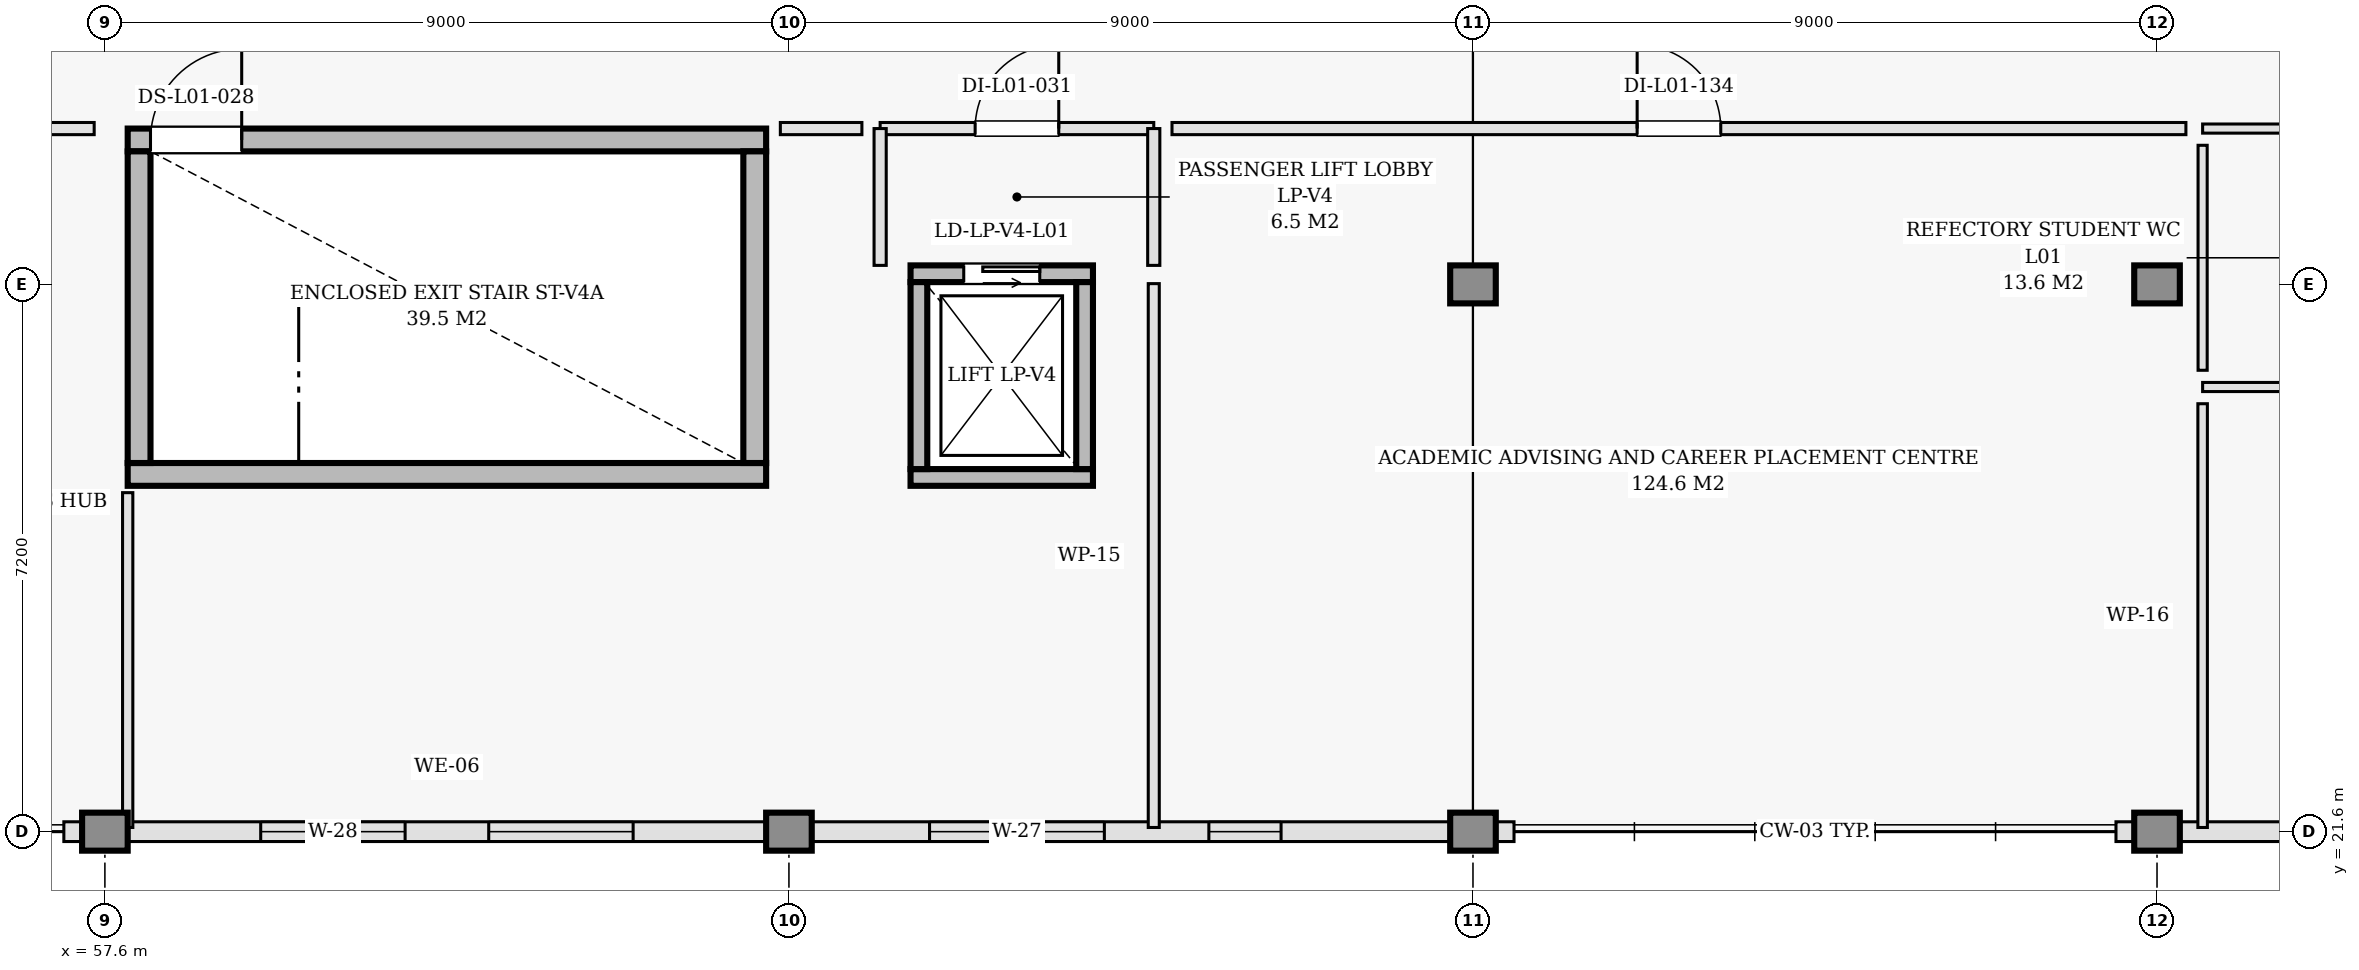
"""IFC4 building model, lengths in metres.
Left out: names, types, materials, properties, quantities, classifications, styles, units other than length and angle.
Written with IfcOpenShell. Run it as: python <this file> out.ifc"""

import sys

from ifc_helpers import new_model, si_unit, direction, frame, frame_2d, origin, origin_2d, place, context, subcontext, project, spatial, rectangle, extrude, element, fill, save


model = new_model("IFC4")
c1 = context("Model", 3, precision=1e-05, world=origin(), true_north=direction((0.0, 1.0)))
c2 = subcontext(c1, "Body", "Model", "MODEL_VIEW")
j1 = project(units=[si_unit("LENGTHUNIT", "METRE"), si_unit("PLANEANGLEUNIT", "RADIAN")], contexts=[c1])
p1 = place(None, origin())
s1 = spatial("IfcSite", under=j1, at=p1, CompositionType="ELEMENT")
p2 = place(p1, origin())
s2 = spatial("IfcBuilding", under=s1, at=p2, CompositionType="ELEMENT")
p3 = place(p2, frame((0.0, 0.0, 4.8)))
s3 = spatial("IfcBuildingStorey", under=s2, at=p3, CompositionType="ELEMENT", Elevation=4.8)
for number, where, z_axis, x_axis in (
    (1, (57.6, 21.6, 0.0), (0.0, 0.0, 1.0), (1.0, 0.0, 0.0)),
    (2, (66.6, 21.6, 0.0), (0.0, 0.0, 1.0), (1.0, 0.0, 0.0)),
    (3, (75.6, 21.6, 0.0), (0.0, 0.0, 1.0), (1.0, 0.0, 0.0)),
    (4, (75.6, 28.8, 0.0), (0.0, 0.0, 1.0), (1.0, 0.0, 0.0)),
    (5, (84.6, 21.6, 0.0), (0.0, 0.0, 1.0), (1.0, 0.0, 0.0)),
    (6, (84.6, 28.8, 0.0), (0.0, 0.0, 1.0), (1.0, 0.0, 0.0)),
):
    element("IfcColumn", number, at=place(p3, frame(where, z_axis=z_axis, x_axis=x_axis)), inside=s3, PredefinedType="COLUMN", context=c2, shape_type="SweptSolid", body=[
        extrude(rectangle(XDim=0.5, YDim=0.5, at=origin_2d()), origin(), (0.0, 0.0, 1.0), 4.8),
    ])
p4 = place(p3, frame((57.06, 21.6, 0.0), z_axis=(0.0, 0.0, 1.0), x_axis=(1.0, 0.0, 0.0)))
e7 = element("IfcWall", 7, at=p4, inside=s3, PredefinedType="SOLIDWALL", context=c2, shape_type="SweptSolid", body=[
    extrude(rectangle(XDim=0.54, YDim=0.26, at=frame_2d((0.27, 0.0))), origin(), (0.0, 0.0, 1.0), 4.8),
])
p5 = place(p3, frame((57.6, 21.6, 0.0), z_axis=(0.0, 0.0, 1.0), x_axis=(1.0, 0.0, 0.0)))
e8 = element("IfcWall", 8, at=p5, inside=s3, PredefinedType="SOLIDWALL", context=c2, shape_type="SweptSolid", body=[
    extrude(rectangle(XDim=9.0, YDim=0.26, at=frame_2d((4.5, 0.0))), origin(), (0.0, 0.0, 1.0), 4.8),
])
p6 = place(p5, frame((2.05, 0.0, 0.9)))
e9 = element("IfcOpeningElement", 9, at=p6, cuts=e8, PredefinedType="OPENING", context=c2, shape_type="SweptSolid", body=[
    extrude(rectangle(XDim=1.9, YDim=1.85, at=frame_2d((0.95, 0.925))), frame((0.0, 0.14, 0.0), z_axis=(0.0, -1.0, 0.0), x_axis=(1.0, 0.0, 0.0)), (0.0, 0.0, 1.0), 0.28),
])
p7 = place(p5, frame((5.05, 0.0, 0.9)))
e10 = element("IfcOpeningElement", 10, at=p7, cuts=e8, PredefinedType="OPENING", context=c2, shape_type="SweptSolid", body=[
    extrude(rectangle(XDim=1.9, YDim=1.85, at=frame_2d((0.95, 0.925))), frame((0.0, 0.14, 0.0), z_axis=(0.0, -1.0, 0.0), x_axis=(1.0, 0.0, 0.0)), (0.0, 0.0, 1.0), 0.28),
])
p8 = place(p3, frame((66.6, 21.6, 0.0), z_axis=(0.0, 0.0, 1.0), x_axis=(1.0, 0.0, 0.0)))
e11 = element("IfcWall", 11, at=p8, inside=s3, PredefinedType="SOLIDWALL", context=c2, shape_type="SweptSolid", body=[
    extrude(rectangle(XDim=9.0, YDim=0.26, at=frame_2d((4.5, 0.0))), origin(), (0.0, 0.0, 1.0), 4.8),
])
p9 = place(p8, frame((1.85, 0.0, 0.9)))
e12 = element("IfcOpeningElement", 12, at=p9, cuts=e11, PredefinedType="OPENING", context=c2, shape_type="SweptSolid", body=[
    extrude(rectangle(XDim=2.3, YDim=1.9, at=frame_2d((1.15, 0.95))), frame((0.0, 0.14, 0.0), z_axis=(0.0, -1.0, 0.0), x_axis=(1.0, 0.0, 0.0)), (0.0, 0.0, 1.0), 0.28),
])
p10 = place(p8, frame((5.525, 0.0, 0.9)))
e13 = element("IfcOpeningElement", 13, at=p10, cuts=e11, PredefinedType="OPENING", context=c2, shape_type="SweptSolid", body=[
    extrude(rectangle(XDim=0.95, YDim=1.35, at=frame_2d((0.475, 0.675))), frame((0.0, 0.14, 0.0), z_axis=(0.0, -1.0, 0.0), x_axis=(1.0, 0.0, 0.0)), (0.0, 0.0, 1.0), 0.28),
])
p11 = place(p3, frame((75.6, 21.6, 0.0), z_axis=(0.0, 0.0, 1.0), x_axis=(1.0, 0.0, 0.0)))
e14 = element("IfcWall", 14, at=p11, inside=s3, PredefinedType="SOLIDWALL", context=c2, shape_type="SweptSolid", body=[
    extrude(rectangle(XDim=0.54, YDim=0.26, at=frame_2d((0.27, 0.0))), origin(), (0.0, 0.0, 1.0), 4.8),
])
p12 = place(p3, frame((84.06, 21.6, 0.0), z_axis=(0.0, 0.0, 1.0), x_axis=(1.0, 0.0, 0.0)))
e15 = element("IfcWall", 15, at=p12, inside=s3, PredefinedType="SOLIDWALL", context=c2, shape_type="SweptSolid", body=[
    extrude(rectangle(XDim=0.54, YDim=0.26, at=frame_2d((0.27, 0.0))), origin(), (0.0, 0.0, 1.0), 4.8),
])
p13 = place(p3, frame((84.6, 21.6, 0.0), z_axis=(0.0, 0.0, 1.0), x_axis=(1.0, 0.0, 0.0)))
e16 = element("IfcWall", 16, at=p13, inside=s3, PredefinedType="SOLIDWALL", context=c2, shape_type="SweptSolid", body=[
    extrude(rectangle(XDim=9.0, YDim=0.26, at=frame_2d((4.5, 0.0))), origin(), (0.0, 0.0, 1.0), 4.8),
])
p14 = place(p13, frame((1.7, 0.0, 0.9)))
e17 = element("IfcOpeningElement", 17, at=p14, cuts=e16, PredefinedType="OPENING", context=c2, shape_type="SweptSolid", body=[
    extrude(rectangle(XDim=2.6, YDim=1.95, at=frame_2d((1.3, 0.975))), frame((0.0, 0.14, 0.0), z_axis=(0.0, -1.0, 0.0), x_axis=(1.0, 0.0, 0.0)), (0.0, 0.0, 1.0), 0.28),
])
p15 = place(p13, frame((4.7, 0.0, 0.9)))
e18 = element("IfcOpeningElement", 18, at=p15, cuts=e16, PredefinedType="OPENING", context=c2, shape_type="SweptSolid", body=[
    extrude(rectangle(XDim=2.6, YDim=1.95, at=frame_2d((1.3, 0.975))), frame((0.0, 0.14, 0.0), z_axis=(0.0, -1.0, 0.0), x_axis=(1.0, 0.0, 0.0)), (0.0, 0.0, 1.0), 0.28),
])
p16 = place(p3, frame((57.9, 26.3, 0.0), z_axis=(0.0, 0.0, 1.0), x_axis=(1.0, 0.0, 0.0)))
e19 = element("IfcWall", 19, at=p16, inside=s3, PredefinedType="SHEAR", context=c2, shape_type="SweptSolid", body=[
    extrude(rectangle(XDim=8.4, YDim=0.3, at=frame_2d((4.2, 0.0))), origin(), (0.0, 0.0, 1.0), 4.6),
])
p17 = place(p3, frame((57.9, 30.7, 0.0), z_axis=(0.0, 0.0, 1.0), x_axis=(1.0, 0.0, 0.0)))
e20 = element("IfcWall", 20, at=p17, inside=s3, PredefinedType="SHEAR", context=c2, shape_type="SweptSolid", body=[
    extrude(rectangle(XDim=8.4, YDim=0.3, at=frame_2d((4.2, 0.0))), origin(), (0.0, 0.0, 1.0), 4.6),
])
p18 = place(p17, frame((0.3, 0.0, 0.0)))
e21 = element("IfcOpeningElement", 21, at=p18, cuts=e20, PredefinedType="OPENING", context=c2, shape_type="SweptSolid", body=[
    extrude(rectangle(XDim=1.2, YDim=2.15, at=frame_2d((0.6, 1.075))), frame((0.0, 0.16, 0.0), z_axis=(0.0, -1.0, 0.0), x_axis=(1.0, 0.0, 0.0)), (0.0, 0.0, 1.0), 0.32),
])
for number, where, z_axis, x_axis in (
    (22, (58.05, 26.45, 0.0), (0.0, 0.0, 1.0), (0.0, 1.0, 0.0)),
    (23, (66.15, 26.45, 0.0), (0.0, 0.0, 1.0), (0.0, 1.0, 0.0)),
):
    element("IfcWall", number, at=place(p3, frame(where, z_axis=z_axis, x_axis=x_axis)), inside=s3, PredefinedType="SHEAR", context=c2, shape_type="SweptSolid", body=[
        extrude(rectangle(XDim=4.1, YDim=0.3, at=frame_2d((2.05, 0.0))), origin(), (0.0, 0.0, 1.0), 4.6),
    ])
p19 = place(p3, frame((68.2, 26.26, 0.0), z_axis=(0.0, 0.0, 1.0), x_axis=(1.0, 0.0, 0.0)))
e24 = element("IfcWall", 24, at=p19, inside=s3, PredefinedType="SHEAR", context=c2, shape_type="SweptSolid", body=[
    extrude(rectangle(XDim=2.4, YDim=0.22, at=frame_2d((1.2, 0.0))), origin(), (0.0, 0.0, 1.0), 4.45),
])
p20 = place(p3, frame((68.2, 28.94, 0.0), z_axis=(0.0, 0.0, 1.0), x_axis=(1.0, 0.0, 0.0)))
e25 = element("IfcWall", 25, at=p20, inside=s3, PredefinedType="SHEAR", context=c2, shape_type="SweptSolid", body=[
    extrude(rectangle(XDim=2.4, YDim=0.22, at=frame_2d((1.2, 0.0))), origin(), (0.0, 0.0, 1.0), 4.45),
])
p21 = place(p20, frame((0.7, 0.0, 0.0)))
e26 = element("IfcOpeningElement", 26, at=p21, cuts=e25, PredefinedType="OPENING", context=c2, shape_type="SweptSolid", body=[
    extrude(rectangle(XDim=1.0, YDim=2.15, at=frame_2d((0.5, 1.075))), frame((0.0, 0.12, 0.0), z_axis=(0.0, -1.0, 0.0), x_axis=(1.0, 0.0, 0.0)), (0.0, 0.0, 1.0), 0.24),
])
for number, where, z_axis, x_axis in (
    (27, (68.31, 26.37, 0.0), (0.0, 0.0, 1.0), (0.0, 1.0, 0.0)),
    (28, (70.49, 26.37, 0.0), (0.0, 0.0, 1.0), (0.0, 1.0, 0.0)),
):
    element("IfcWall", number, at=place(p3, frame(where, z_axis=z_axis, x_axis=x_axis)), inside=s3, PredefinedType="SHEAR", context=c2, shape_type="SweptSolid", body=[
        extrude(rectangle(XDim=2.46, YDim=0.22, at=frame_2d((1.23, 0.0))), origin(), (0.0, 0.0, 1.0), 4.45),
    ])
p22 = place(p3, frame((67.8, 30.85, 0.0), z_axis=(0.0, 0.0, 1.0), x_axis=(1.0, 0.0, 0.0)))
e29 = element("IfcWall", 29, at=p22, inside=s3, PredefinedType="PARTITIONING", context=c2, shape_type="SweptSolid", body=[
    extrude(rectangle(XDim=3.6, YDim=0.16, at=frame_2d((1.8, 0.0))), origin(), (0.0, 0.0, 1.0), 4.45),
])
p23 = place(p22, frame((1.25, 0.0, 0.0)))
e30 = element("IfcOpeningElement", 30, at=p23, cuts=e29, PredefinedType="OPENING", context=c2, shape_type="SweptSolid", body=[
    extrude(rectangle(XDim=1.1, YDim=2.15, at=frame_2d((0.55, 1.075))), frame((0.0, 0.09, 0.0), z_axis=(0.0, -1.0, 0.0), x_axis=(1.0, 0.0, 0.0)), (0.0, 0.0, 1.0), 0.18),
])
for number, where, z_axis, x_axis in (
    (31, (67.8, 29.05, 0.0), (0.0, 0.0, 1.0), (0.0, 1.0, 0.0)),
    (32, (71.4, 29.05, 0.0), (0.0, 0.0, 1.0), (0.0, 1.0, 0.0)),
):
    element("IfcWall", number, at=place(p3, frame(where, z_axis=z_axis, x_axis=x_axis)), inside=s3, PredefinedType="PARTITIONING", context=c2, shape_type="SweptSolid", body=[
        extrude(rectangle(XDim=1.8, YDim=0.16, at=frame_2d((0.9, 0.0))), origin(), (0.0, 0.0, 1.0), 4.45),
    ])
p24 = place(p3, frame((85.2, 30.85, 0.0), z_axis=(0.0, 0.0, 1.0), x_axis=(1.0, 0.0, 0.0)))
e33 = element("IfcWall", 33, at=p24, inside=s3, PredefinedType="PARTITIONING", context=c2, shape_type="SweptSolid", body=[
    extrude(rectangle(XDim=3.78, YDim=0.12, at=frame_2d((1.89, 0.0))), origin(), (0.0, 0.0, 1.0), 4.48),
])
p25 = place(p24, frame((1.34, 0.0, 0.0)))
e34 = element("IfcOpeningElement", 34, at=p25, cuts=e33, PredefinedType="OPENING", context=c2, shape_type="SweptSolid", body=[
    extrude(rectangle(XDim=1.1, YDim=2.15, at=frame_2d((0.55, 1.075))), frame((0.0, 0.07, 0.0), z_axis=(0.0, -1.0, 0.0), x_axis=(1.0, 0.0, 0.0)), (0.0, 0.0, 1.0), 0.14),
])
p26 = place(p3, frame((85.2, 27.45, 0.0), z_axis=(0.0, 0.0, 1.0), x_axis=(1.0, 0.0, 0.0)))
e35 = element("IfcWall", 35, at=p26, inside=s3, PredefinedType="PARTITIONING", context=c2, shape_type="SweptSolid", body=[
    extrude(rectangle(XDim=3.78, YDim=0.12, at=frame_2d((1.89, 0.0))), origin(), (0.0, 0.0, 1.0), 4.48),
])
p27 = place(p3, frame((85.2, 27.67, 0.0), z_axis=(0.0, 0.0, 1.0), x_axis=(0.0, 1.0, 0.0)))
e36 = element("IfcWall", 36, at=p27, inside=s3, PredefinedType="PARTITIONING", context=c2, shape_type="SweptSolid", body=[
    extrude(rectangle(XDim=2.96, YDim=0.12, at=frame_2d((1.48, 0.0))), origin(), (0.0, 0.0, 1.0), 4.48),
])
p28 = place(p3, frame((54.146, 30.85, 0.0), z_axis=(0.0, 0.0, 1.0), x_axis=(1.0, 0.0, 0.0)))
e37 = element("IfcWall", 37, at=p28, inside=s3, PredefinedType="PARTITIONING", context=c2, shape_type="SweptSolid", body=[
    extrude(rectangle(XDim=3.313, YDim=0.16, at=frame_2d((1.656, 0.0))), origin(), (0.0, 0.0, 1.0), 4.48),
])
p29 = place(p28, frame((1.107, 0.0, 0.0)))
e38 = element("IfcOpeningElement", 38, at=p29, cuts=e37, PredefinedType="OPENING", context=c2, shape_type="SweptSolid", body=[
    extrude(rectangle(XDim=1.1, YDim=2.15, at=frame_2d((0.55, 1.075))), frame((0.0, 0.09, 0.0), z_axis=(0.0, -1.0, 0.0), x_axis=(1.0, 0.0, 0.0)), (0.0, 0.0, 1.0), 0.18),
])
p30 = place(p3, frame((57.9, 21.655, 0.0), z_axis=(0.0, 0.0, 1.0), x_axis=(0.0, 1.0, 0.0)))
e39 = element("IfcWall", 39, at=p30, inside=s3, PredefinedType="PARTITIONING", context=c2, shape_type="SweptSolid", body=[
    extrude(rectangle(XDim=4.405, YDim=0.135, at=frame_2d((2.203, 0.0))), origin(), (0.0, 0.0, 1.0), 4.48),
])
p31 = place(p3, frame((71.64, 30.85, 0.0), z_axis=(0.0, 0.0, 1.0), x_axis=(1.0, 0.0, 0.0)))
e40 = element("IfcWall", 40, at=p31, inside=s3, PredefinedType="PARTITIONING", context=c2, shape_type="SweptSolid", body=[
    extrude(rectangle(XDim=13.34, YDim=0.16, at=frame_2d((6.67, 0.0))), origin(), (0.0, 0.0, 1.0), 4.48),
])
p32 = place(p31, frame((6.12, 0.0, 0.0)))
e41 = element("IfcOpeningElement", 41, at=p32, cuts=e40, PredefinedType="OPENING", context=c2, shape_type="SweptSolid", body=[
    extrude(rectangle(XDim=1.1, YDim=2.15, at=frame_2d((0.55, 1.075))), frame((0.0, 0.09, 0.0), z_axis=(0.0, -1.0, 0.0), x_axis=(1.0, 0.0, 0.0)), (0.0, 0.0, 1.0), 0.18),
])
p33 = place(p3, frame((85.2, 21.655, 0.0), z_axis=(0.0, 0.0, 1.0), x_axis=(0.0, 1.0, 0.0)))
e42 = element("IfcWall", 42, at=p33, inside=s3, PredefinedType="PARTITIONING", context=c2, shape_type="SweptSolid", body=[
    extrude(rectangle(XDim=5.575, YDim=0.125, at=frame_2d((2.788, 0.0))), origin(), (0.0, 0.0, 1.0), 4.48),
])
p34 = place(p3, frame((71.4, 21.655, 0.0), z_axis=(0.0, 0.0, 1.0), x_axis=(0.0, 1.0, 0.0)))
e43 = element("IfcWall", 43, at=p34, inside=s3, PredefinedType="PARTITIONING", context=c2, shape_type="SweptSolid", body=[
    extrude(rectangle(XDim=7.155, YDim=0.145, at=frame_2d((3.578, 0.0))), origin(), (0.0, 0.0, 1.0), 4.48),
])
p35 = place(p3, frame((66.487, 30.85, 0.0), z_axis=(0.0, 0.0, 1.0), x_axis=(1.0, 0.0, 0.0)))
e44 = element("IfcWall", 44, at=p35, inside=s3, PredefinedType="PARTITIONING", context=c2, shape_type="SweptSolid", body=[
    extrude(rectangle(XDim=1.073, YDim=0.16, at=frame_2d((0.537, 0.0))), origin(), (0.0, 0.0, 1.0), 4.48),
])
p36 = place(p6, origin())
e45 = element("IfcWindow", 45, at=p36, inside=s3, PartitioningType="DOUBLE_PANEL_VERTICAL", PredefinedType="WINDOW", context=c2, shape_type="SweptSolid", body=[
    extrude(rectangle(XDim=1.9, YDim=1.85, at=frame_2d((0.95, 0.925))), frame((0.0, 0.03, 0.0), z_axis=(0.0, -1.0, 0.0), x_axis=(1.0, 0.0, 0.0)), (0.0, 0.0, 1.0), 0.06),
])
fill(e9, e45)
p37 = place(p7, origin())
e46 = element("IfcWindow", 46, at=p37, inside=s3, PartitioningType="DOUBLE_PANEL_VERTICAL", PredefinedType="WINDOW", context=c2, shape_type="SweptSolid", body=[
    extrude(rectangle(XDim=1.9, YDim=1.85, at=frame_2d((0.95, 0.925))), frame((0.0, 0.03, 0.0), z_axis=(0.0, -1.0, 0.0), x_axis=(1.0, 0.0, 0.0)), (0.0, 0.0, 1.0), 0.06),
])
fill(e10, e46)
p38 = place(p9, origin())
e47 = element("IfcWindow", 47, at=p38, inside=s3, PartitioningType="DOUBLE_PANEL_VERTICAL", PredefinedType="WINDOW", context=c2, shape_type="SweptSolid", body=[
    extrude(rectangle(XDim=2.3, YDim=1.9, at=frame_2d((1.15, 0.95))), frame((0.0, 0.03, 0.0), z_axis=(0.0, -1.0, 0.0), x_axis=(1.0, 0.0, 0.0)), (0.0, 0.0, 1.0), 0.06),
])
fill(e12, e47)
p39 = place(p10, origin())
e48 = element("IfcWindow", 48, at=p39, inside=s3, PartitioningType="DOUBLE_PANEL_VERTICAL", PredefinedType="WINDOW", context=c2, shape_type="SweptSolid", body=[
    extrude(rectangle(XDim=0.95, YDim=1.35, at=frame_2d((0.475, 0.675))), frame((0.0, 0.03, 0.0), z_axis=(0.0, -1.0, 0.0), x_axis=(1.0, 0.0, 0.0)), (0.0, 0.0, 1.0), 0.06),
])
fill(e13, e48)
p40 = place(p18, origin())
e49 = element("IfcDoor", 49, at=p40, inside=s3, OperationType="SINGLE_SWING_RIGHT", PredefinedType="DOOR", context=c2, shape_type="SweptSolid", body=[
    extrude(rectangle(XDim=1.2, YDim=2.15, at=frame_2d((0.6, 1.075))), frame((0.0, 0.025, 0.0), z_axis=(0.0, -1.0, 0.0), x_axis=(1.0, 0.0, 0.0)), (0.0, 0.0, 1.0), 0.05),
])
fill(e21, e49)
p41 = place(p21, origin())
e50 = element("IfcDoor", 50, at=p41, inside=s3, OperationType="SLIDING_TO_RIGHT", PredefinedType="DOOR", context=c2, shape_type="SweptSolid", body=[
    extrude(rectangle(XDim=1.0, YDim=2.15, at=frame_2d((0.5, 1.075))), frame((0.0, 0.025, 0.0), z_axis=(0.0, -1.0, 0.0), x_axis=(1.0, 0.0, 0.0)), (0.0, 0.0, 1.0), 0.05),
])
fill(e26, e50)
p42 = place(p23, origin())
e51 = element("IfcDoor", 51, at=p42, inside=s3, OperationType="SINGLE_SWING_RIGHT", PredefinedType="DOOR", context=c2, shape_type="SweptSolid", body=[
    extrude(rectangle(XDim=1.1, YDim=2.15, at=frame_2d((0.55, 1.075))), frame((0.0, 0.025, 0.0), z_axis=(0.0, -1.0, 0.0), x_axis=(1.0, 0.0, 0.0)), (0.0, 0.0, 1.0), 0.05),
])
fill(e30, e51)
p43 = place(p32, origin())
e52 = element("IfcDoor", 52, at=p43, inside=s3, OperationType="SINGLE_SWING_LEFT", PredefinedType="DOOR", context=c2, shape_type="SweptSolid", body=[
    extrude(rectangle(XDim=1.1, YDim=2.15, at=frame_2d((0.55, 1.075))), frame((0.0, 0.025, 0.0), z_axis=(0.0, -1.0, 0.0), x_axis=(1.0, 0.0, 0.0)), (0.0, 0.0, 1.0), 0.05),
])
fill(e41, e52)
save(model, sys.argv[1])
